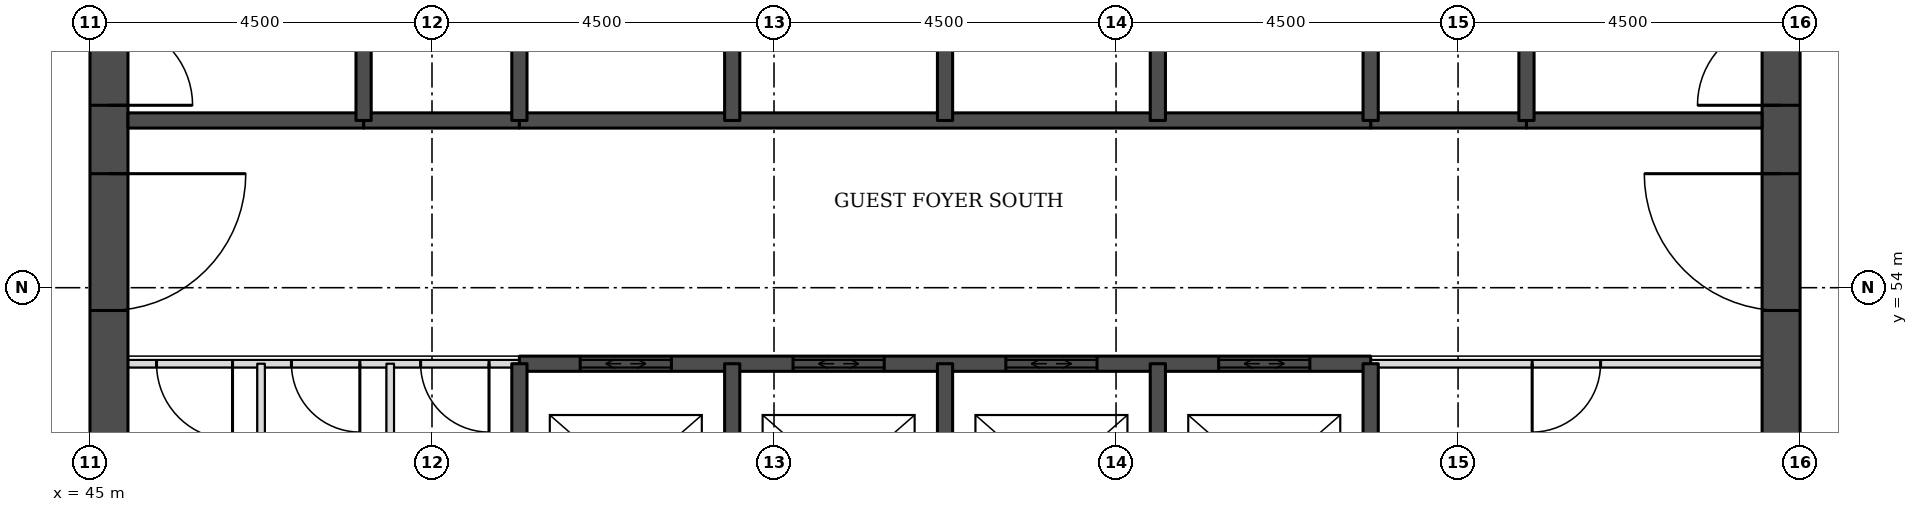
"""IFC4 building model, lengths in metres.
Left out: names, types, materials, properties, quantities, classifications, styles, units other than length and angle.
Written with IfcOpenShell. Run it as: python <this file> out.ifc"""

import sys

from ifc_helpers import new_model, si_unit, direction, frame, frame_2d, origin, place, context, subcontext, project, spatial, rectangle, extrude, element, fill, save


model = new_model("IFC4")
c1 = context("Model", 3, precision=1e-05, world=origin(), true_north=direction((0.0, 1.0)))
c2 = subcontext(c1, "Body", "Model", "MODEL_VIEW")
j1 = project(units=[si_unit("LENGTHUNIT", "METRE"), si_unit("PLANEANGLEUNIT", "RADIAN")], contexts=[c1])
p1 = place(None, origin())
s1 = spatial("IfcSite", under=j1, at=p1, CompositionType="ELEMENT")
p2 = place(p1, origin())
s2 = spatial("IfcBuilding", under=s1, at=p2, CompositionType="ELEMENT")
p3 = place(p2, frame((0.0, 0.0, 36.3)))
s3 = spatial("IfcBuildingStorey", under=s2, at=p3, CompositionType="ELEMENT", Elevation=36.3)
p4 = place(p3, frame((45.25, 49.5, 0.0), z_axis=(0.0, 0.0, 1.0), x_axis=(0.0, 1.0, 0.0)))
e1 = element("IfcWall", 1, at=p4, inside=s3, PredefinedType="SHEAR", context=c2, shape_type="SweptSolid", body=[
    extrude(rectangle(XDim=22.5, YDim=0.5, at=frame_2d((11.25, 0.0))), origin(), (0.0, 0.0, 1.0), 3.3),
])
p5 = place(p4, frame((4.2, 0.0, 0.0)))
e2 = element("IfcOpeningElement", 2, at=p5, cuts=e1, PredefinedType="OPENING", context=c2, shape_type="SweptSolid", body=[
    extrude(rectangle(XDim=1.8, YDim=2.1, at=frame_2d((0.9, 1.05))), frame((0.0, 0.26, 0.0), z_axis=(0.0, -1.0, 0.0), x_axis=(1.0, 0.0, 0.0)), (0.0, 0.0, 1.0), 0.52),
])
p6 = place(p4, frame((6.9, 0.0, 0.0)))
e3 = element("IfcOpeningElement", 3, at=p6, cuts=e1, PredefinedType="OPENING", context=c2, shape_type="SweptSolid", body=[
    extrude(rectangle(XDim=1.1, YDim=2.1, at=frame_2d((0.55, 1.05))), frame((0.0, 0.26, 0.0), z_axis=(0.0, -1.0, 0.0), x_axis=(1.0, 0.0, 0.0)), (0.0, 0.0, 1.0), 0.52),
])
p7 = place(p4, frame((13.6, 0.0, 0.0)))
e4 = element("IfcOpeningElement", 4, at=p7, cuts=e1, PredefinedType="OPENING", context=c2, shape_type="SweptSolid", body=[
    extrude(rectangle(XDim=1.1, YDim=2.1, at=frame_2d((0.55, 1.05))), frame((0.0, 0.26, 0.0), z_axis=(0.0, -1.0, 0.0), x_axis=(1.0, 0.0, 0.0)), (0.0, 0.0, 1.0), 0.52),
])
p8 = place(p4, frame((16.5, 0.0, 0.0)))
e5 = element("IfcOpeningElement", 5, at=p8, cuts=e1, PredefinedType="OPENING", context=c2, shape_type="SweptSolid", body=[
    extrude(rectangle(XDim=1.8, YDim=2.1, at=frame_2d((0.9, 1.05))), frame((0.0, 0.26, 0.0), z_axis=(0.0, -1.0, 0.0), x_axis=(1.0, 0.0, 0.0)), (0.0, 0.0, 1.0), 0.52),
])
p9 = place(p3, frame((67.25, 49.5, 0.0), z_axis=(0.0, 0.0, 1.0), x_axis=(0.0, 1.0, 0.0)))
e6 = element("IfcWall", 6, at=p9, inside=s3, PredefinedType="SHEAR", context=c2, shape_type="SweptSolid", body=[
    extrude(rectangle(XDim=22.5, YDim=0.5, at=frame_2d((11.25, 0.0))), origin(), (0.0, 0.0, 1.0), 3.3),
])
p10 = place(p9, frame((4.2, 0.0, 0.0)))
e7 = element("IfcOpeningElement", 7, at=p10, cuts=e6, PredefinedType="OPENING", context=c2, shape_type="SweptSolid", body=[
    extrude(rectangle(XDim=1.8, YDim=2.1, at=frame_2d((0.9, 1.05))), frame((0.0, 0.26, 0.0), z_axis=(0.0, -1.0, 0.0), x_axis=(1.0, 0.0, 0.0)), (0.0, 0.0, 1.0), 0.52),
])
p11 = place(p9, frame((6.9, 0.0, 0.0)))
e8 = element("IfcOpeningElement", 8, at=p11, cuts=e6, PredefinedType="OPENING", context=c2, shape_type="SweptSolid", body=[
    extrude(rectangle(XDim=1.1, YDim=2.1, at=frame_2d((0.55, 1.05))), frame((0.0, 0.26, 0.0), z_axis=(0.0, -1.0, 0.0), x_axis=(1.0, 0.0, 0.0)), (0.0, 0.0, 1.0), 0.52),
])
p12 = place(p9, frame((13.6, 0.0, 0.0)))
e9 = element("IfcOpeningElement", 9, at=p12, cuts=e6, PredefinedType="OPENING", context=c2, shape_type="SweptSolid", body=[
    extrude(rectangle(XDim=1.1, YDim=2.1, at=frame_2d((0.55, 1.05))), frame((0.0, 0.26, 0.0), z_axis=(0.0, -1.0, 0.0), x_axis=(1.0, 0.0, 0.0)), (0.0, 0.0, 1.0), 0.52),
])
p13 = place(p9, frame((16.5, 0.0, 0.0)))
e10 = element("IfcOpeningElement", 10, at=p13, cuts=e6, PredefinedType="OPENING", context=c2, shape_type="SweptSolid", body=[
    extrude(rectangle(XDim=1.8, YDim=2.1, at=frame_2d((0.9, 1.05))), frame((0.0, 0.26, 0.0), z_axis=(0.0, -1.0, 0.0), x_axis=(1.0, 0.0, 0.0)), (0.0, 0.0, 1.0), 0.52),
])
p14 = place(p3, frame((45.5, 53.0, 0.0), z_axis=(0.0, 0.0, 1.0), x_axis=(1.0, 0.0, 0.0)))
e11 = element("IfcWall", 11, at=p14, inside=s3, PredefinedType="PARTITIONING", context=c2, shape_type="SweptSolid", body=[
    extrude(rectangle(XDim=5.15, YDim=0.1, at=frame_2d((2.575, 0.0))), origin(), (0.0, 0.0, 1.0), 3.08),
])
p15 = place(p14, frame((0.375, 0.0, 0.0)))
e12 = element("IfcOpeningElement", 12, at=p15, cuts=e11, PredefinedType="OPENING", context=c2, shape_type="SweptSolid", body=[
    extrude(rectangle(XDim=1.0, YDim=2.1, at=frame_2d((0.5, 1.05))), frame((0.0, 0.06, 0.0), z_axis=(0.0, -1.0, 0.0), x_axis=(1.0, 0.0, 0.0)), (0.0, 0.0, 1.0), 0.12),
])
p16 = place(p14, frame((2.151, 0.0, 0.0)))
e13 = element("IfcOpeningElement", 13, at=p16, cuts=e11, PredefinedType="OPENING", context=c2, shape_type="SweptSolid", body=[
    extrude(rectangle(XDim=0.9, YDim=2.1, at=frame_2d((0.45, 1.05))), frame((0.0, 0.06, 0.0), z_axis=(0.0, -1.0, 0.0), x_axis=(1.0, 0.0, 0.0)), (0.0, 0.0, 1.0), 0.12),
])
p17 = place(p14, frame((3.85, 0.0, 0.0)))
e14 = element("IfcOpeningElement", 14, at=p17, cuts=e11, PredefinedType="OPENING", context=c2, shape_type="SweptSolid", body=[
    extrude(rectangle(XDim=0.9, YDim=2.1, at=frame_2d((0.45, 1.05))), frame((0.0, 0.06, 0.0), z_axis=(0.0, -1.0, 0.0), x_axis=(1.0, 0.0, 0.0)), (0.0, 0.0, 1.0), 0.12),
])
p18 = place(p3, frame((61.85, 53.0, 0.0), z_axis=(0.0, 0.0, 1.0), x_axis=(1.0, 0.0, 0.0)))
e15 = element("IfcWall", 15, at=p18, inside=s3, PredefinedType="PARTITIONING", context=c2, shape_type="SweptSolid", body=[
    extrude(rectangle(XDim=5.15, YDim=0.1, at=frame_2d((2.575, 0.0))), origin(), (0.0, 0.0, 1.0), 3.08),
])
p19 = place(p18, frame((2.125, 0.0, 0.0)))
e16 = element("IfcOpeningElement", 16, at=p19, cuts=e15, PredefinedType="OPENING", context=c2, shape_type="SweptSolid", body=[
    extrude(rectangle(XDim=0.9, YDim=2.1, at=frame_2d((0.45, 1.05))), frame((0.0, 0.06, 0.0), z_axis=(0.0, -1.0, 0.0), x_axis=(1.0, 0.0, 0.0)), (0.0, 0.0, 1.0), 0.12),
])
p20 = place(p3, frame((50.65, 53.0, 0.0), z_axis=(0.0, 0.0, 1.0), x_axis=(1.0, 0.0, 0.0)))
e17 = element("IfcWall", 17, at=p20, inside=s3, PredefinedType="SOLIDWALL", context=c2, shape_type="SweptSolid", body=[
    extrude(rectangle(XDim=11.2, YDim=0.2, at=frame_2d((5.6, 0.0))), origin(), (0.0, 0.0, 1.0), 3.08),
])
p21 = place(p20, frame((0.8, 0.0, 0.0)))
e18 = element("IfcOpeningElement", 18, at=p21, cuts=e17, PredefinedType="OPENING", context=c2, shape_type="SweptSolid", body=[
    extrude(rectangle(XDim=1.2, YDim=2.1, at=frame_2d((0.6, 1.05))), frame((0.0, 0.11, 0.0), z_axis=(0.0, -1.0, 0.0), x_axis=(1.0, 0.0, 0.0)), (0.0, 0.0, 1.0), 0.22),
])
p22 = place(p20, frame((3.6, 0.0, 0.0)))
e19 = element("IfcOpeningElement", 19, at=p22, cuts=e17, PredefinedType="OPENING", context=c2, shape_type="SweptSolid", body=[
    extrude(rectangle(XDim=1.2, YDim=2.1, at=frame_2d((0.6, 1.05))), frame((0.0, 0.11, 0.0), z_axis=(0.0, -1.0, 0.0), x_axis=(1.0, 0.0, 0.0)), (0.0, 0.0, 1.0), 0.22),
])
p23 = place(p20, frame((6.4, 0.0, 0.0)))
e20 = element("IfcOpeningElement", 20, at=p23, cuts=e17, PredefinedType="OPENING", context=c2, shape_type="SweptSolid", body=[
    extrude(rectangle(XDim=1.2, YDim=2.1, at=frame_2d((0.6, 1.05))), frame((0.0, 0.11, 0.0), z_axis=(0.0, -1.0, 0.0), x_axis=(1.0, 0.0, 0.0)), (0.0, 0.0, 1.0), 0.22),
])
p24 = place(p20, frame((9.2, 0.0, 0.0)))
e21 = element("IfcOpeningElement", 21, at=p24, cuts=e17, PredefinedType="OPENING", context=c2, shape_type="SweptSolid", body=[
    extrude(rectangle(XDim=1.2, YDim=2.1, at=frame_2d((0.6, 1.05))), frame((0.0, 0.11, 0.0), z_axis=(0.0, -1.0, 0.0), x_axis=(1.0, 0.0, 0.0)), (0.0, 0.0, 1.0), 0.22),
])
for number, where, z_axis, x_axis in (
    (22, (48.6, 56.2, 0.0), (0.0, 0.0, 1.0), (1.0, 0.0, 0.0)),
    (23, (61.85, 56.2, 0.0), (0.0, 0.0, 1.0), (1.0, 0.0, 0.0)),
):
    element("IfcWall", number, at=place(p3, frame(where, z_axis=z_axis, x_axis=x_axis)), inside=s3, PredefinedType="SOLIDWALL", context=c2, shape_type="SweptSolid", body=[
        extrude(rectangle(XDim=2.05, YDim=0.2, at=frame_2d((1.025, 0.0))), origin(), (0.0, 0.0, 1.0), 3.08),
    ])
p25 = place(p3, frame((45.5, 56.2, 0.0), z_axis=(0.0, 0.0, 1.0), x_axis=(1.0, 0.0, 0.0)))
e24 = element("IfcWall", 24, at=p25, inside=s3, PredefinedType="SOLIDWALL", context=c2, shape_type="SweptSolid", body=[
    extrude(rectangle(XDim=3.1, YDim=0.2, at=frame_2d((1.55, 0.0))), origin(), (0.0, 0.0, 1.0), 3.08),
])
p26 = place(p3, frame((50.65, 56.2, 0.0), z_axis=(0.0, 0.0, 1.0), x_axis=(1.0, 0.0, 0.0)))
e25 = element("IfcWall", 25, at=p26, inside=s3, PredefinedType="SOLIDWALL", context=c2, shape_type="SweptSolid", body=[
    extrude(rectangle(XDim=11.2, YDim=0.2, at=frame_2d((5.6, 0.0))), origin(), (0.0, 0.0, 1.0), 3.08),
])
p27 = place(p3, frame((63.9, 56.2, 0.0), z_axis=(0.0, 0.0, 1.0), x_axis=(1.0, 0.0, 0.0)))
e26 = element("IfcWall", 26, at=p27, inside=s3, PredefinedType="SOLIDWALL", context=c2, shape_type="SweptSolid", body=[
    extrude(rectangle(XDim=3.1, YDim=0.2, at=frame_2d((1.55, 0.0))), origin(), (0.0, 0.0, 1.0), 3.08),
])
p28 = place(p3, frame((47.251, 50.0, 0.0), z_axis=(0.0, 0.0, 1.0), x_axis=(0.0, 1.0, 0.0)))
e27 = element("IfcWall", 27, at=p28, inside=s3, PredefinedType="PARTITIONING", context=c2, shape_type="SweptSolid", body=[
    extrude(rectangle(XDim=3.0, YDim=0.1, at=frame_2d((1.5, 0.0))), origin(), (0.0, 0.0, 1.0), 3.08),
])
p29 = place(p3, frame((48.6, 56.2, 0.0), z_axis=(0.0, 0.0, 1.0), x_axis=(0.0, 1.0, 0.0)))
e28 = element("IfcWall", 28, at=p29, inside=s3, PredefinedType="SOLIDWALL", context=c2, shape_type="SweptSolid", body=[
    extrude(rectangle(XDim=5.8, YDim=0.2, at=frame_2d((2.9, 0.0))), origin(), (0.0, 0.0, 1.0), 3.08),
])
p30 = place(p3, frame((48.95, 50.0, 0.0), z_axis=(0.0, 0.0, 1.0), x_axis=(0.0, 1.0, 0.0)))
e29 = element("IfcWall", 29, at=p30, inside=s3, PredefinedType="PARTITIONING", context=c2, shape_type="SweptSolid", body=[
    extrude(rectangle(XDim=3.0, YDim=0.1, at=frame_2d((1.5, 0.0))), origin(), (0.0, 0.0, 1.0), 3.08),
])
p31 = place(p3, frame((50.65, 50.0, 0.0), z_axis=(0.0, 0.0, 1.0), x_axis=(0.0, 1.0, 0.0)))
e30 = element("IfcWall", 30, at=p31, inside=s3, PredefinedType="SOLIDWALL", context=c2, shape_type="SweptSolid", body=[
    extrude(rectangle(XDim=3.0, YDim=0.2, at=frame_2d((1.5, 0.0))), origin(), (0.0, 0.0, 1.0), 3.08),
])
p32 = place(p3, frame((50.65, 56.2, 0.0), z_axis=(0.0, 0.0, 1.0), x_axis=(0.0, 1.0, 0.0)))
e31 = element("IfcWall", 31, at=p32, inside=s3, PredefinedType="SOLIDWALL", context=c2, shape_type="SweptSolid", body=[
    extrude(rectangle(XDim=2.8, YDim=0.2, at=frame_2d((1.4, 0.0))), origin(), (0.0, 0.0, 1.0), 3.08),
])
p33 = place(p3, frame((53.45, 50.0, 0.0), z_axis=(0.0, 0.0, 1.0), x_axis=(0.0, 1.0, 0.0)))
e32 = element("IfcWall", 32, at=p33, inside=s3, PredefinedType="SOLIDWALL", context=c2, shape_type="SweptSolid", body=[
    extrude(rectangle(XDim=3.0, YDim=0.2, at=frame_2d((1.5, 0.0))), origin(), (0.0, 0.0, 1.0), 3.08),
])
p34 = place(p3, frame((53.45, 56.2, 0.0), z_axis=(0.0, 0.0, 1.0), x_axis=(0.0, 1.0, 0.0)))
e33 = element("IfcWall", 33, at=p34, inside=s3, PredefinedType="SOLIDWALL", context=c2, shape_type="SweptSolid", body=[
    extrude(rectangle(XDim=2.8, YDim=0.2, at=frame_2d((1.4, 0.0))), origin(), (0.0, 0.0, 1.0), 3.08),
])
p35 = place(p3, frame((56.25, 50.0, 0.0), z_axis=(0.0, 0.0, 1.0), x_axis=(0.0, 1.0, 0.0)))
e34 = element("IfcWall", 34, at=p35, inside=s3, PredefinedType="SOLIDWALL", context=c2, shape_type="SweptSolid", body=[
    extrude(rectangle(XDim=3.0, YDim=0.2, at=frame_2d((1.5, 0.0))), origin(), (0.0, 0.0, 1.0), 3.08),
])
p36 = place(p3, frame((56.25, 56.2, 0.0), z_axis=(0.0, 0.0, 1.0), x_axis=(0.0, 1.0, 0.0)))
e35 = element("IfcWall", 35, at=p36, inside=s3, PredefinedType="SOLIDWALL", context=c2, shape_type="SweptSolid", body=[
    extrude(rectangle(XDim=2.8, YDim=0.2, at=frame_2d((1.4, 0.0))), origin(), (0.0, 0.0, 1.0), 3.08),
])
p37 = place(p3, frame((59.05, 50.0, 0.0), z_axis=(0.0, 0.0, 1.0), x_axis=(0.0, 1.0, 0.0)))
e36 = element("IfcWall", 36, at=p37, inside=s3, PredefinedType="SOLIDWALL", context=c2, shape_type="SweptSolid", body=[
    extrude(rectangle(XDim=3.0, YDim=0.2, at=frame_2d((1.5, 0.0))), origin(), (0.0, 0.0, 1.0), 3.08),
])
p38 = place(p3, frame((59.05, 56.2, 0.0), z_axis=(0.0, 0.0, 1.0), x_axis=(0.0, 1.0, 0.0)))
e37 = element("IfcWall", 37, at=p38, inside=s3, PredefinedType="SOLIDWALL", context=c2, shape_type="SweptSolid", body=[
    extrude(rectangle(XDim=2.8, YDim=0.2, at=frame_2d((1.4, 0.0))), origin(), (0.0, 0.0, 1.0), 3.08),
])
p39 = place(p3, frame((61.85, 50.0, 0.0), z_axis=(0.0, 0.0, 1.0), x_axis=(0.0, 1.0, 0.0)))
e38 = element("IfcWall", 38, at=p39, inside=s3, PredefinedType="SOLIDWALL", context=c2, shape_type="SweptSolid", body=[
    extrude(rectangle(XDim=3.0, YDim=0.2, at=frame_2d((1.5, 0.0))), origin(), (0.0, 0.0, 1.0), 3.08),
])
p40 = place(p3, frame((61.85, 56.2, 0.0), z_axis=(0.0, 0.0, 1.0), x_axis=(0.0, 1.0, 0.0)))
e39 = element("IfcWall", 39, at=p40, inside=s3, PredefinedType="SOLIDWALL", context=c2, shape_type="SweptSolid", body=[
    extrude(rectangle(XDim=2.8, YDim=0.2, at=frame_2d((1.4, 0.0))), origin(), (0.0, 0.0, 1.0), 3.08),
])
p41 = place(p3, frame((63.9, 56.2, 0.0), z_axis=(0.0, 0.0, 1.0), x_axis=(0.0, 1.0, 0.0)))
e40 = element("IfcWall", 40, at=p41, inside=s3, PredefinedType="SOLIDWALL", context=c2, shape_type="SweptSolid", body=[
    extrude(rectangle(XDim=5.8, YDim=0.2, at=frame_2d((2.9, 0.0))), origin(), (0.0, 0.0, 1.0), 3.08),
])
p42 = place(p21, origin())
e41 = element("IfcDoor", 41, at=p42, inside=s3, OperationType="DOUBLE_DOOR_SLIDING", PredefinedType="DOOR", context=c2, shape_type="SweptSolid", body=[
    extrude(rectangle(XDim=1.2, YDim=2.1, at=frame_2d((0.6, 1.05))), frame((0.0, 0.025, 0.0), z_axis=(0.0, -1.0, 0.0), x_axis=(1.0, 0.0, 0.0)), (0.0, 0.0, 1.0), 0.05),
])
fill(e18, e41)
p43 = place(p22, origin())
e42 = element("IfcDoor", 42, at=p43, inside=s3, OperationType="DOUBLE_DOOR_SLIDING", PredefinedType="DOOR", context=c2, shape_type="SweptSolid", body=[
    extrude(rectangle(XDim=1.2, YDim=2.1, at=frame_2d((0.6, 1.05))), frame((0.0, 0.025, 0.0), z_axis=(0.0, -1.0, 0.0), x_axis=(1.0, 0.0, 0.0)), (0.0, 0.0, 1.0), 0.05),
])
fill(e19, e42)
p44 = place(p23, origin())
e43 = element("IfcDoor", 43, at=p44, inside=s3, OperationType="DOUBLE_DOOR_SLIDING", PredefinedType="DOOR", context=c2, shape_type="SweptSolid", body=[
    extrude(rectangle(XDim=1.2, YDim=2.1, at=frame_2d((0.6, 1.05))), frame((0.0, 0.025, 0.0), z_axis=(0.0, -1.0, 0.0), x_axis=(1.0, 0.0, 0.0)), (0.0, 0.0, 1.0), 0.05),
])
fill(e20, e43)
p45 = place(p24, origin())
e44 = element("IfcDoor", 44, at=p45, inside=s3, OperationType="DOUBLE_DOOR_SLIDING", PredefinedType="DOOR", context=c2, shape_type="SweptSolid", body=[
    extrude(rectangle(XDim=1.2, YDim=2.1, at=frame_2d((0.6, 1.05))), frame((0.0, 0.025, 0.0), z_axis=(0.0, -1.0, 0.0), x_axis=(1.0, 0.0, 0.0)), (0.0, 0.0, 1.0), 0.05),
])
fill(e21, e44)
p46 = place(p5, frame((1.8, 0.0, 0.0), z_axis=(0.0, 0.0, 1.0), x_axis=(-1.0, 0.0, 0.0)))
e45 = element("IfcDoor", 45, at=p46, inside=s3, OperationType="SINGLE_SWING_LEFT", PredefinedType="DOOR", context=c2, shape_type="SweptSolid", body=[
    extrude(rectangle(XDim=1.8, YDim=2.1, at=frame_2d((0.9, 1.05))), frame((0.0, 0.025, 0.0), z_axis=(0.0, -1.0, 0.0), x_axis=(1.0, 0.0, 0.0)), (0.0, 0.0, 1.0), 0.05),
])
fill(e2, e45)
p47 = place(p6, frame((1.1, 0.0, 0.0), z_axis=(0.0, 0.0, 1.0), x_axis=(-1.0, 0.0, 0.0)))
e46 = element("IfcDoor", 46, at=p47, inside=s3, OperationType="SINGLE_SWING_RIGHT", PredefinedType="DOOR", context=c2, shape_type="SweptSolid", body=[
    extrude(rectangle(XDim=1.1, YDim=2.1, at=frame_2d((0.55, 1.05))), frame((0.0, 0.025, 0.0), z_axis=(0.0, -1.0, 0.0), x_axis=(1.0, 0.0, 0.0)), (0.0, 0.0, 1.0), 0.05),
])
fill(e3, e46)
p48 = place(p10, origin())
e47 = element("IfcDoor", 47, at=p48, inside=s3, OperationType="SINGLE_SWING_RIGHT", PredefinedType="DOOR", context=c2, shape_type="SweptSolid", body=[
    extrude(rectangle(XDim=1.8, YDim=2.1, at=frame_2d((0.9, 1.05))), frame((0.0, 0.025, 0.0), z_axis=(0.0, -1.0, 0.0), x_axis=(1.0, 0.0, 0.0)), (0.0, 0.0, 1.0), 0.05),
])
fill(e7, e47)
p49 = place(p11, origin())
e48 = element("IfcDoor", 48, at=p49, inside=s3, OperationType="SINGLE_SWING_LEFT", PredefinedType="DOOR", context=c2, shape_type="SweptSolid", body=[
    extrude(rectangle(XDim=1.1, YDim=2.1, at=frame_2d((0.55, 1.05))), frame((0.0, 0.025, 0.0), z_axis=(0.0, -1.0, 0.0), x_axis=(1.0, 0.0, 0.0)), (0.0, 0.0, 1.0), 0.05),
])
fill(e8, e48)
p50 = place(p19, frame((0.9, 0.0, 0.0), z_axis=(0.0, 0.0, 1.0), x_axis=(-1.0, 0.0, 0.0)))
e49 = element("IfcDoor", 49, at=p50, inside=s3, OperationType="SINGLE_SWING_RIGHT", PredefinedType="DOOR", context=c2, shape_type="SweptSolid", body=[
    extrude(rectangle(XDim=0.9, YDim=2.1, at=frame_2d((0.45, 1.05))), frame((0.0, 0.025, 0.0), z_axis=(0.0, -1.0, 0.0), x_axis=(1.0, 0.0, 0.0)), (0.0, 0.0, 1.0), 0.05),
])
fill(e16, e49)
p51 = place(p15, frame((1.0, 0.0, 0.0), z_axis=(0.0, 0.0, 1.0), x_axis=(-1.0, 0.0, 0.0)))
e50 = element("IfcDoor", 50, at=p51, inside=s3, OperationType="SINGLE_SWING_LEFT", PredefinedType="DOOR", context=c2, shape_type="SweptSolid", body=[
    extrude(rectangle(XDim=1.0, YDim=2.1, at=frame_2d((0.5, 1.05))), frame((0.0, 0.025, 0.0), z_axis=(0.0, -1.0, 0.0), x_axis=(1.0, 0.0, 0.0)), (0.0, 0.0, 1.0), 0.05),
])
fill(e12, e50)
p52 = place(p16, frame((0.9, 0.0, 0.0), z_axis=(0.0, 0.0, 1.0), x_axis=(-1.0, 0.0, 0.0)))
e51 = element("IfcDoor", 51, at=p52, inside=s3, OperationType="SINGLE_SWING_LEFT", PredefinedType="DOOR", context=c2, shape_type="SweptSolid", body=[
    extrude(rectangle(XDim=0.9, YDim=2.1, at=frame_2d((0.45, 1.05))), frame((0.0, 0.025, 0.0), z_axis=(0.0, -1.0, 0.0), x_axis=(1.0, 0.0, 0.0)), (0.0, 0.0, 1.0), 0.05),
])
fill(e13, e51)
p53 = place(p17, frame((0.9, 0.0, 0.0), z_axis=(0.0, 0.0, 1.0), x_axis=(-1.0, 0.0, 0.0)))
e52 = element("IfcDoor", 52, at=p53, inside=s3, OperationType="SINGLE_SWING_LEFT", PredefinedType="DOOR", context=c2, shape_type="SweptSolid", body=[
    extrude(rectangle(XDim=0.9, YDim=2.1, at=frame_2d((0.45, 1.05))), frame((0.0, 0.025, 0.0), z_axis=(0.0, -1.0, 0.0), x_axis=(1.0, 0.0, 0.0)), (0.0, 0.0, 1.0), 0.05),
])
fill(e14, e52)
save(model, sys.argv[1])
